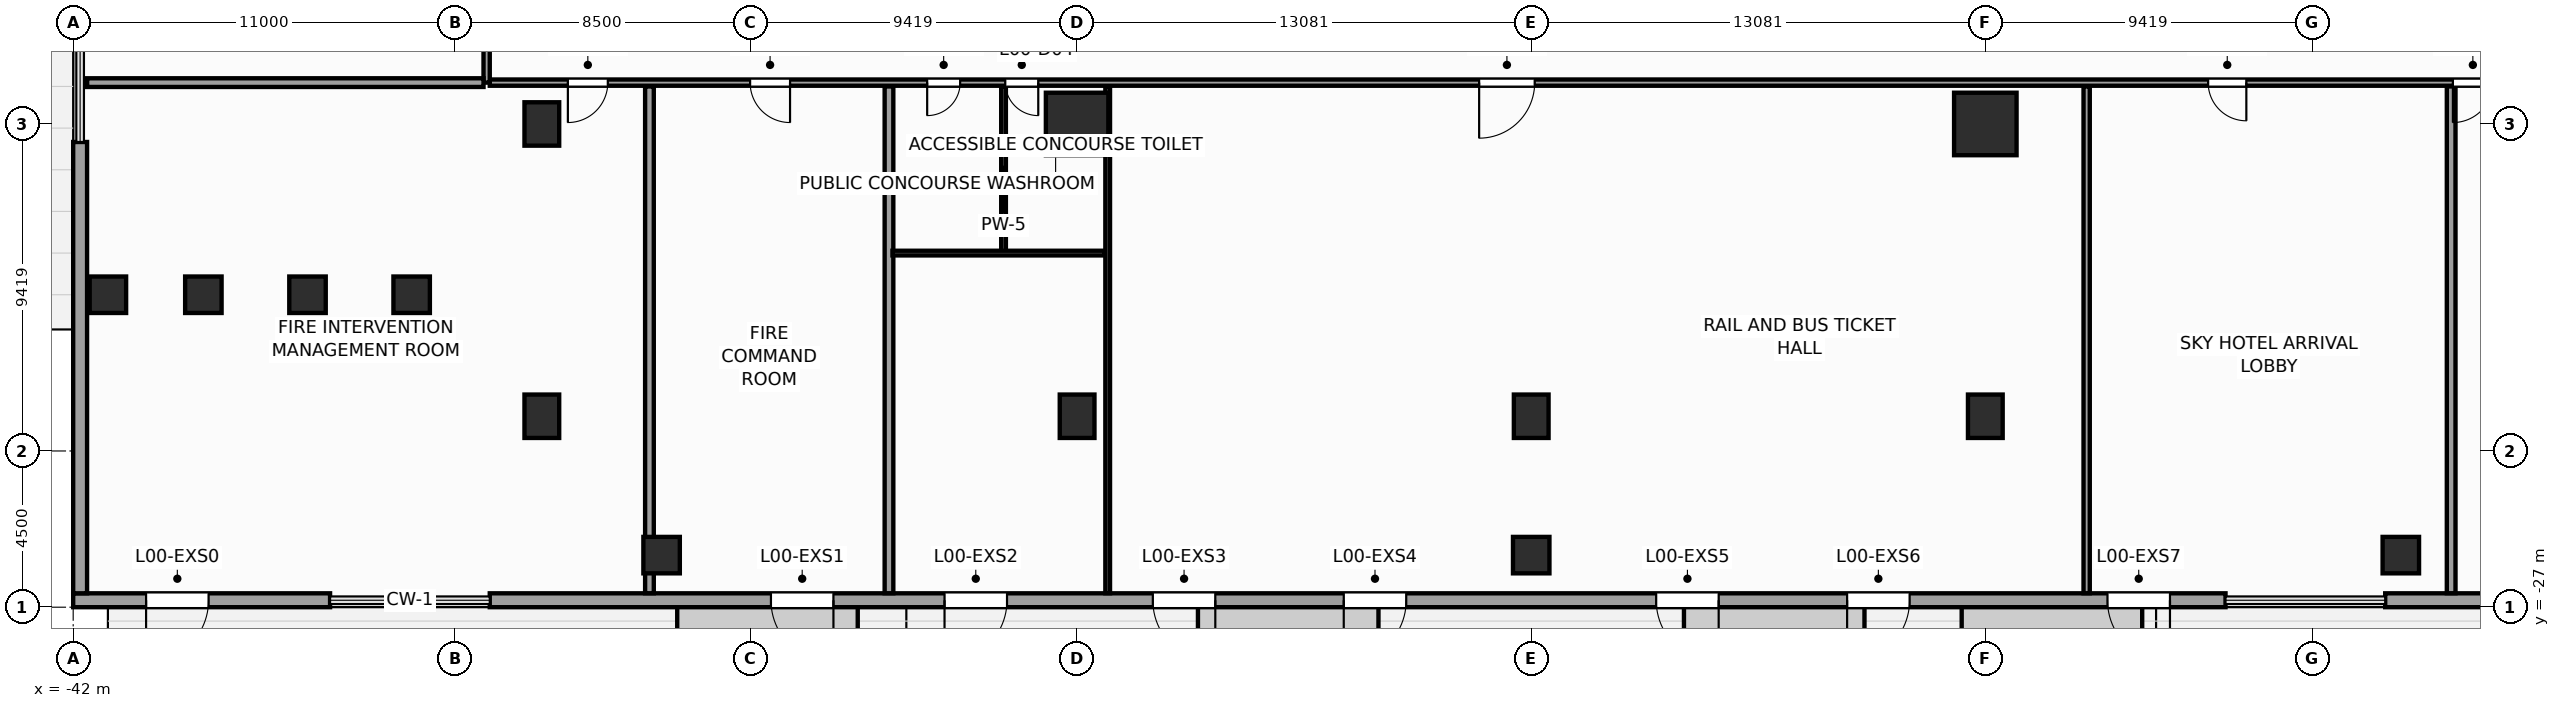
"""IFC4 building model, lengths in metres.
Left out: names, types, materials, properties, quantities, classifications, styles, units other than length and angle.
Written with IfcOpenShell. Run it as: python <this file> out.ifc"""

import sys

from ifc_helpers import new_model, si_unit, direction, frame, frame_2d, origin, origin_2d, place, context, subcontext, project, spatial, rectangle, extrude, source, transform, mapped, element, fill, save


model = new_model("IFC4")
c1 = context("Model", 3, precision=1e-05, world=origin(), true_north=direction((0.0, 1.0)))
c2 = subcontext(c1, "Body", "Model", "MODEL_VIEW")
j1 = project(units=[si_unit("LENGTHUNIT", "METRE"), si_unit("PLANEANGLEUNIT", "RADIAN")], contexts=[c1])
p1 = place(None, origin())
s1 = spatial("IfcSite", under=j1, at=p1, CompositionType="ELEMENT")
p2 = place(p1, origin())
s2 = spatial("IfcBuilding", under=s1, at=p2, CompositionType="ELEMENT")
p3 = place(p2, origin())
s3 = spatial("IfcBuildingStorey", under=s2, at=p3, CompositionType="ELEMENT", Elevation=0.0)
m1 = source(origin(), c2, "Body", "SweptSolid", [
    extrude(rectangle(XDim=1.8, YDim=1.8, at=origin_2d()), origin(), (0.0, 0.0, 1.0), 6.0),
])
for number, where, z_axis, x_axis in (
    (1, (-13.081, -13.081, 0.0), (0.0, 0.0, 1.0), (1.0, 0.0, 0.0)),
    (2, (13.081, -13.081, 0.0), (0.0, 0.0, 1.0), (1.0, 0.0, 0.0)),
):
    element("IfcColumn", number, at=place(p3, frame(where, z_axis=z_axis, x_axis=x_axis)), inside=s3, PredefinedType="COLUMN", context=c2, shape_type="MappedRepresentation", body=[
        mapped(m1, transform((0.0, 0.0, 0.0), scale=1.0)),
    ])
m2 = source(origin(), c2, "Body", "SweptSolid", [
    extrude(rectangle(XDim=1.0, YDim=1.25, at=origin_2d()), origin(), (0.0, 0.0, 1.0), 6.0),
])
for number, where, z_axis, x_axis in (
    (3, (-28.5, -21.5, 0.0), (0.0, 0.0, 1.0), (1.0, 0.0, 0.0)),
    (4, (-13.081, -21.5, 0.0), (0.0, 0.0, 1.0), (1.0, 0.0, 0.0)),
    (5, (0.0, -21.5, 0.0), (0.0, 0.0, 1.0), (1.0, 0.0, 0.0)),
    (6, (13.081, -21.5, 0.0), (0.0, 0.0, 1.0), (1.0, 0.0, 0.0)),
    (7, (-28.5, -13.081, 0.0), (0.0, 0.0, 1.0), (1.0, 0.0, 0.0)),
):
    element("IfcColumn", number, at=place(p3, frame(where, z_axis=z_axis, x_axis=x_axis)), inside=s3, PredefinedType="COLUMN", context=c2, shape_type="MappedRepresentation", body=[
        mapped(m2, transform((0.0, 0.0, 0.0), scale=1.0)),
    ])
m3 = source(origin(), c2, "Body", "SweptSolid", [
    extrude(rectangle(XDim=1.05, YDim=1.05, at=origin_2d()), origin(), (0.0, 0.0, 1.0), 6.0),
])
for number, where, z_axis, x_axis in (
    (8, (-25.05, -25.5, 0.0), (0.0, 0.0, 1.0), (1.0, 0.0, 0.0)),
    (9, (0.0, -25.5, 0.0), (0.0, 0.0, 1.0), (1.0, 0.0, 0.0)),
    (10, (25.05, -25.5, 0.0), (0.0, 0.0, 1.0), (1.0, 0.0, 0.0)),
    (11, (-32.25, -18.0, 0.0), (0.0, 0.0, 1.0), (1.0, 0.0, 0.0)),
    (12, (-35.25, -18.0, 0.0), (0.0, 0.0, 1.0), (1.0, 0.0, 0.0)),
    (13, (-38.25, -18.0, 0.0), (0.0, 0.0, 1.0), (1.0, 0.0, 0.0)),
    (14, (-41.0, -18.0, 0.0), (0.0, 0.0, 1.0), (1.0, 0.0, 0.0)),
):
    element("IfcColumn", number, at=place(p3, frame(where, z_axis=z_axis, x_axis=x_axis)), inside=s3, PredefinedType="COLUMN", context=c2, shape_type="MappedRepresentation", body=[
        mapped(m3, transform((0.0, 0.0, 0.0), scale=1.0)),
    ])
p4 = place(p3, frame((-42.0, -26.8, 0.0), z_axis=(0.0, 0.0, 1.0), x_axis=(1.0, 0.0, 0.0)))
e15 = element("IfcWall", 15, at=p4, inside=s3, PredefinedType="STANDARD", context=c2, shape_type="SweptSolid", body=[
    extrude(rectangle(XDim=7.4, YDim=0.4, at=frame_2d((3.7, 0.0))), origin(), (0.0, 0.0, 1.0), 5.66),
])
p5 = place(p4, frame((2.1, 0.0, 0.0)))
e16 = element("IfcOpeningElement", 16, at=p5, cuts=e15, PredefinedType="OPENING", context=c2, shape_type="SweptSolid", body=[
    extrude(rectangle(XDim=1.8, YDim=2.4, at=frame_2d((0.9, 1.2))), frame((0.0, 0.21, 0.0), z_axis=(0.0, -1.0, 0.0), x_axis=(1.0, 0.0, 0.0)), (0.0, 0.0, 1.0), 0.42),
])
p6 = place(p3, frame((-30.0, -26.8, 0.0), z_axis=(0.0, 0.0, 1.0), x_axis=(1.0, 0.0, 0.0)))
e17 = element("IfcWall", 17, at=p6, inside=s3, PredefinedType="STANDARD", context=c2, shape_type="SweptSolid", body=[
    extrude(rectangle(XDim=50.0, YDim=0.4, at=frame_2d((25.0, 0.0))), origin(), (0.0, 0.0, 1.0), 5.66),
])
p7 = place(p6, frame((8.1, 0.0, 0.0)))
e18 = element("IfcOpeningElement", 18, at=p7, cuts=e17, PredefinedType="OPENING", context=c2, shape_type="SweptSolid", body=[
    extrude(rectangle(XDim=1.8, YDim=2.4, at=frame_2d((0.9, 1.2))), frame((0.0, 0.21, 0.0), z_axis=(0.0, -1.0, 0.0), x_axis=(1.0, 0.0, 0.0)), (0.0, 0.0, 1.0), 0.42),
])
p8 = place(p6, frame((13.1, 0.0, 0.0)))
e19 = element("IfcOpeningElement", 19, at=p8, cuts=e17, PredefinedType="OPENING", context=c2, shape_type="SweptSolid", body=[
    extrude(rectangle(XDim=1.8, YDim=2.4, at=frame_2d((0.9, 1.2))), frame((0.0, 0.21, 0.0), z_axis=(0.0, -1.0, 0.0), x_axis=(1.0, 0.0, 0.0)), (0.0, 0.0, 1.0), 0.42),
])
p9 = place(p6, frame((19.1, 0.0, 0.0)))
e20 = element("IfcOpeningElement", 20, at=p9, cuts=e17, PredefinedType="OPENING", context=c2, shape_type="SweptSolid", body=[
    extrude(rectangle(XDim=1.8, YDim=2.4, at=frame_2d((0.9, 1.2))), frame((0.0, 0.21, 0.0), z_axis=(0.0, -1.0, 0.0), x_axis=(1.0, 0.0, 0.0)), (0.0, 0.0, 1.0), 0.42),
])
p10 = place(p6, frame((24.6, 0.0, 0.0)))
e21 = element("IfcOpeningElement", 21, at=p10, cuts=e17, PredefinedType="OPENING", context=c2, shape_type="SweptSolid", body=[
    extrude(rectangle(XDim=1.8, YDim=2.4, at=frame_2d((0.9, 1.2))), frame((0.0, 0.21, 0.0), z_axis=(0.0, -1.0, 0.0), x_axis=(1.0, 0.0, 0.0)), (0.0, 0.0, 1.0), 0.42),
])
p11 = place(p6, frame((33.6, 0.0, 0.0)))
e22 = element("IfcOpeningElement", 22, at=p11, cuts=e17, PredefinedType="OPENING", context=c2, shape_type="SweptSolid", body=[
    extrude(rectangle(XDim=1.8, YDim=2.4, at=frame_2d((0.9, 1.2))), frame((0.0, 0.21, 0.0), z_axis=(0.0, -1.0, 0.0), x_axis=(1.0, 0.0, 0.0)), (0.0, 0.0, 1.0), 0.42),
])
p12 = place(p6, frame((39.1, 0.0, 0.0)))
e23 = element("IfcOpeningElement", 23, at=p12, cuts=e17, PredefinedType="OPENING", context=c2, shape_type="SweptSolid", body=[
    extrude(rectangle(XDim=1.8, YDim=2.4, at=frame_2d((0.9, 1.2))), frame((0.0, 0.21, 0.0), z_axis=(0.0, -1.0, 0.0), x_axis=(1.0, 0.0, 0.0)), (0.0, 0.0, 1.0), 0.42),
])
p13 = place(p6, frame((46.6, 0.0, 0.0)))
e24 = element("IfcOpeningElement", 24, at=p13, cuts=e17, PredefinedType="OPENING", context=c2, shape_type="SweptSolid", body=[
    extrude(rectangle(XDim=1.8, YDim=2.4, at=frame_2d((0.9, 1.2))), frame((0.0, 0.21, 0.0), z_axis=(0.0, -1.0, 0.0), x_axis=(1.0, 0.0, 0.0)), (0.0, 0.0, 1.0), 0.42),
])
p14 = place(p3, frame((24.6, -26.8, 0.0), z_axis=(0.0, 0.0, 1.0), x_axis=(1.0, 0.0, 0.0)))
e25 = element("IfcWall", 25, at=p14, inside=s3, PredefinedType="STANDARD", context=c2, shape_type="SweptSolid", body=[
    extrude(rectangle(XDim=17.4, YDim=0.4, at=frame_2d((8.7, 0.0))), origin(), (0.0, 0.0, 1.0), 5.66),
])
p15 = place(p14, frame((3.5, 0.0, 0.0)))
e26 = element("IfcOpeningElement", 26, at=p15, cuts=e25, PredefinedType="OPENING", context=c2, shape_type="SweptSolid", body=[
    extrude(rectangle(XDim=3.2, YDim=3.6, at=frame_2d((1.6, 1.8))), frame((0.0, 0.21, 0.0), z_axis=(0.0, -1.0, 0.0), x_axis=(1.0, 0.0, 0.0)), (0.0, 0.0, 1.0), 0.42),
])
p16 = place(p14, frame((9.5, 0.0, 0.0)))
e27 = element("IfcOpeningElement", 27, at=p16, cuts=e25, PredefinedType="OPENING", context=c2, shape_type="SweptSolid", body=[
    extrude(rectangle(XDim=3.2, YDim=3.6, at=frame_2d((1.6, 1.8))), frame((0.0, 0.21, 0.0), z_axis=(0.0, -1.0, 0.0), x_axis=(1.0, 0.0, 0.0)), (0.0, 0.0, 1.0), 0.42),
])
p17 = place(p3, frame((-41.8, -26.6, 0.0), z_axis=(0.0, 0.0, 1.0), x_axis=(0.0, 1.0, 0.0)))
e28 = element("IfcWall", 28, at=p17, inside=s3, PredefinedType="STANDARD", context=c2, shape_type="SweptSolid", body=[
    extrude(rectangle(XDim=13.0, YDim=0.4, at=frame_2d((6.5, 0.0))), origin(), (0.0, 0.0, 1.0), 5.66),
])
p18 = place(p3, frame((-30.0, -11.89, 0.0), z_axis=(0.0, 0.0, 1.0), x_axis=(1.0, 0.0, 0.0)))
e29 = element("IfcWall", 29, at=p18, inside=s3, PredefinedType="PARTITIONING", context=c2, shape_type="SweptSolid", body=[
    extrude(rectangle(XDim=60.0, YDim=0.18, at=frame_2d((30.0, 0.0))), origin(), (0.0, 0.0, 1.0), 5.66),
])
p19 = place(p18, frame((2.25, 0.0, 0.0)))
e30 = element("IfcOpeningElement", 30, at=p19, cuts=e29, PredefinedType="OPENING", context=c2, shape_type="SweptSolid", body=[
    extrude(rectangle(XDim=1.15, YDim=2.25, at=frame_2d((0.575, 1.125))), frame((0.0, 0.1, 0.0), z_axis=(0.0, -1.0, 0.0), x_axis=(1.0, 0.0, 0.0)), (0.0, 0.0, 1.0), 0.2),
])
p20 = place(p18, frame((7.5, 0.0, 0.0)))
e31 = element("IfcOpeningElement", 31, at=p20, cuts=e29, PredefinedType="OPENING", context=c2, shape_type="SweptSolid", body=[
    extrude(rectangle(XDim=1.15, YDim=2.25, at=frame_2d((0.575, 1.125))), frame((0.0, 0.1, 0.0), z_axis=(0.0, -1.0, 0.0), x_axis=(1.0, 0.0, 0.0)), (0.0, 0.0, 1.0), 0.2),
])
p21 = place(p18, frame((12.6, 0.0, 0.0)))
e32 = element("IfcOpeningElement", 32, at=p21, cuts=e29, PredefinedType="OPENING", context=c2, shape_type="SweptSolid", body=[
    extrude(rectangle(XDim=0.95, YDim=2.1, at=frame_2d((0.475, 1.05))), frame((0.0, 0.1, 0.0), z_axis=(0.0, -1.0, 0.0), x_axis=(1.0, 0.0, 0.0)), (0.0, 0.0, 1.0), 0.2),
])
p22 = place(p18, frame((14.85, 0.0, 0.0)))
e33 = element("IfcOpeningElement", 33, at=p22, cuts=e29, PredefinedType="OPENING", context=c2, shape_type="SweptSolid", body=[
    extrude(rectangle(XDim=0.95, YDim=2.1, at=frame_2d((0.475, 1.05))), frame((0.0, 0.1, 0.0), z_axis=(0.0, -1.0, 0.0), x_axis=(1.0, 0.0, 0.0)), (0.0, 0.0, 1.0), 0.2),
])
p23 = place(p18, frame((28.5, 0.0, 0.0)))
e34 = element("IfcOpeningElement", 34, at=p23, cuts=e29, PredefinedType="OPENING", context=c2, shape_type="SweptSolid", body=[
    extrude(rectangle(XDim=1.6, YDim=2.5, at=frame_2d((0.8, 1.25))), frame((0.0, 0.1, 0.0), z_axis=(0.0, -1.0, 0.0), x_axis=(1.0, 0.0, 0.0)), (0.0, 0.0, 1.0), 0.2),
])
p24 = place(p18, frame((49.5, 0.0, 0.0)))
e35 = element("IfcOpeningElement", 35, at=p24, cuts=e29, PredefinedType="OPENING", context=c2, shape_type="SweptSolid", body=[
    extrude(rectangle(XDim=1.1, YDim=2.2, at=frame_2d((0.55, 1.1))), frame((0.0, 0.1, 0.0), z_axis=(0.0, -1.0, 0.0), x_axis=(1.0, 0.0, 0.0)), (0.0, 0.0, 1.0), 0.2),
])
p25 = place(p18, frame((56.55, 0.0, 0.0)))
e36 = element("IfcOpeningElement", 36, at=p25, cuts=e29, PredefinedType="OPENING", context=c2, shape_type="SweptSolid", body=[
    extrude(rectangle(XDim=1.15, YDim=2.25, at=frame_2d((0.575, 1.125))), frame((0.0, 0.1, 0.0), z_axis=(0.0, -1.0, 0.0), x_axis=(1.0, 0.0, 0.0)), (0.0, 0.0, 1.0), 0.2),
])
p26 = place(p3, frame((-30.09, -11.89, 0.0), z_axis=(0.0, 0.0, 1.0), x_axis=(0.0, 1.0, 0.0)))
e37 = element("IfcWall", 37, at=p26, inside=s3, PredefinedType="PARTITIONING", context=c2, shape_type="SweptSolid", body=[
    extrude(rectangle(XDim=3.38, YDim=0.18, at=frame_2d((1.69, 0.0))), origin(), (0.0, 0.0, 1.0), 5.66),
])
p27 = place(p3, frame((-41.598, -11.89, 0.0), z_axis=(0.0, 0.0, 1.0), x_axis=(1.0, 0.0, 0.0)))
e38 = element("IfcWall", 38, at=p27, inside=s3, PredefinedType="PARTITIONING", context=c2, shape_type="SweptSolid", body=[
    extrude(rectangle(XDim=11.418, YDim=0.25, at=frame_2d((5.709, 0.0))), origin(), (0.0, 0.0, 1.0), 5.66),
])
for number, where, z_axis, x_axis in (
    (39, (-25.4, -26.598, 0.0), (0.0, 0.0, 1.0), (0.0, 1.0, 0.0)),
    (40, (-18.5, -26.598, 0.0), (0.0, 0.0, 1.0), (0.0, 1.0, 0.0)),
):
    element("IfcWall", number, at=place(p3, frame(where, z_axis=z_axis, x_axis=x_axis)), inside=s3, PredefinedType="PARTITIONING", context=c2, shape_type="SweptSolid", body=[
        extrude(rectangle(XDim=14.598, YDim=0.25, at=frame_2d((7.299, 0.0))), origin(), (0.0, 0.0, 1.0), 5.66),
    ])
p28 = place(p3, frame((-15.2, -16.8, 0.0), z_axis=(0.0, 0.0, 1.0), x_axis=(0.0, 1.0, 0.0)))
e41 = element("IfcWall", 41, at=p28, inside=s3, PredefinedType="PARTITIONING", context=c2, shape_type="SweptSolid", body=[
    extrude(rectangle(XDim=4.8, YDim=0.135, at=frame_2d((2.4, 0.0))), origin(), (0.0, 0.0, 1.0), 5.66),
])
p29 = place(p3, frame((-12.2, -26.598, 0.0), z_axis=(0.0, 0.0, 1.0), x_axis=(0.0, 1.0, 0.0)))
e42 = element("IfcWall", 42, at=p29, inside=s3, PredefinedType="PARTITIONING", context=c2, shape_type="SweptSolid", body=[
    extrude(rectangle(XDim=14.598, YDim=0.135, at=frame_2d((7.299, 0.0))), origin(), (0.0, 0.0, 1.0), 5.66),
])
p30 = place(p3, frame((-18.4, -16.8, 0.0), z_axis=(0.0, 0.0, 1.0), x_axis=(1.0, 0.0, 0.0)))
e43 = element("IfcWall", 43, at=p30, inside=s3, PredefinedType="PARTITIONING", context=c2, shape_type="SweptSolid", body=[
    extrude(rectangle(XDim=6.1, YDim=0.135, at=frame_2d((3.05, 0.0))), origin(), (0.0, 0.0, 1.0), 5.66),
])
p31 = place(p3, frame((16.0, -26.598, 0.0), z_axis=(0.0, 0.0, 1.0), x_axis=(0.0, 1.0, 0.0)))
e44 = element("IfcWall", 44, at=p31, inside=s3, PredefinedType="PARTITIONING", context=c2, shape_type="SweptSolid", body=[
    extrude(rectangle(XDim=14.598, YDim=0.18, at=frame_2d((7.299, 0.0))), origin(), (0.0, 0.0, 1.0), 5.66),
])
p32 = place(p3, frame((26.5, -26.598, 0.0), z_axis=(0.0, 0.0, 1.0), x_axis=(0.0, 1.0, 0.0)))
e45 = element("IfcWall", 45, at=p32, inside=s3, PredefinedType="PARTITIONING", context=c2, shape_type="SweptSolid", body=[
    extrude(rectangle(XDim=14.598, YDim=0.25, at=frame_2d((7.299, 0.0))), origin(), (0.0, 0.0, 1.0), 5.66),
])
m4 = source(origin(), c2, "Body", "SweptSolid", [
    extrude(rectangle(XDim=1.8, YDim=2.4, at=frame_2d((0.9, 1.2))), frame((0.0, 0.025, 0.0), z_axis=(0.0, -1.0, 0.0), x_axis=(1.0, 0.0, 0.0)), (0.0, 0.0, 1.0), 0.05),
])
p33 = place(p5, frame((1.8, 0.0, 0.0), z_axis=(0.0, 0.0, 1.0), x_axis=(-1.0, 0.0, 0.0)))
e46 = element("IfcDoor", 46, at=p33, inside=s3, OperationType="SINGLE_SWING_LEFT", PredefinedType="DOOR", context=c2, shape_type="MappedRepresentation", body=[
    mapped(m4, transform((0.0, 0.0, 0.0), scale=1.0)),
])
fill(e16, e46)
p34 = place(p7, frame((1.8, 0.0, 0.0), z_axis=(0.0, 0.0, 1.0), x_axis=(-1.0, 0.0, 0.0)))
e47 = element("IfcDoor", 47, at=p34, inside=s3, OperationType="SINGLE_SWING_RIGHT", PredefinedType="DOOR", context=c2, shape_type="MappedRepresentation", body=[
    mapped(m4, transform((0.0, 0.0, 0.0), scale=1.0)),
])
fill(e18, e47)
p35 = place(p8, frame((1.8, 0.0, 0.0), z_axis=(0.0, 0.0, 1.0), x_axis=(-1.0, 0.0, 0.0)))
e48 = element("IfcDoor", 48, at=p35, inside=s3, OperationType="SINGLE_SWING_LEFT", PredefinedType="DOOR", context=c2, shape_type="MappedRepresentation", body=[
    mapped(m4, transform((0.0, 0.0, 0.0), scale=1.0)),
])
fill(e19, e48)
p36 = place(p9, frame((1.8, 0.0, 0.0), z_axis=(0.0, 0.0, 1.0), x_axis=(-1.0, 0.0, 0.0)))
e49 = element("IfcDoor", 49, at=p36, inside=s3, OperationType="SINGLE_SWING_RIGHT", PredefinedType="DOOR", context=c2, shape_type="MappedRepresentation", body=[
    mapped(m4, transform((0.0, 0.0, 0.0), scale=1.0)),
])
fill(e20, e49)
p37 = place(p10, frame((1.8, 0.0, 0.0), z_axis=(0.0, 0.0, 1.0), x_axis=(-1.0, 0.0, 0.0)))
e50 = element("IfcDoor", 50, at=p37, inside=s3, OperationType="SINGLE_SWING_LEFT", PredefinedType="DOOR", context=c2, shape_type="MappedRepresentation", body=[
    mapped(m4, transform((0.0, 0.0, 0.0), scale=1.0)),
])
fill(e21, e50)
p38 = place(p11, frame((1.8, 0.0, 0.0), z_axis=(0.0, 0.0, 1.0), x_axis=(-1.0, 0.0, 0.0)))
e51 = element("IfcDoor", 51, at=p38, inside=s3, OperationType="SINGLE_SWING_RIGHT", PredefinedType="DOOR", context=c2, shape_type="MappedRepresentation", body=[
    mapped(m4, transform((0.0, 0.0, 0.0), scale=1.0)),
])
fill(e22, e51)
p39 = place(p12, frame((1.8, 0.0, 0.0), z_axis=(0.0, 0.0, 1.0), x_axis=(-1.0, 0.0, 0.0)))
e52 = element("IfcDoor", 52, at=p39, inside=s3, OperationType="SINGLE_SWING_LEFT", PredefinedType="DOOR", context=c2, shape_type="MappedRepresentation", body=[
    mapped(m4, transform((0.0, 0.0, 0.0), scale=1.0)),
])
fill(e23, e52)
p40 = place(p13, frame((1.8, 0.0, 0.0), z_axis=(0.0, 0.0, 1.0), x_axis=(-1.0, 0.0, 0.0)))
e53 = element("IfcDoor", 53, at=p40, inside=s3, OperationType="SINGLE_SWING_RIGHT", PredefinedType="DOOR", context=c2, shape_type="MappedRepresentation", body=[
    mapped(m4, transform((0.0, 0.0, 0.0), scale=1.0)),
])
fill(e24, e53)
m5 = source(origin(), c2, "Body", "SweptSolid", [
    extrude(rectangle(XDim=1.15, YDim=2.25, at=frame_2d((0.575, 1.125))), frame((0.0, 0.025, 0.0), z_axis=(0.0, -1.0, 0.0), x_axis=(1.0, 0.0, 0.0)), (0.0, 0.0, 1.0), 0.05),
])
p41 = place(p19, frame((1.15, 0.0, 0.0), z_axis=(0.0, 0.0, 1.0), x_axis=(-1.0, 0.0, 0.0)))
e54 = element("IfcDoor", 54, at=p41, inside=s3, OperationType="SINGLE_SWING_LEFT", PredefinedType="DOOR", context=c2, shape_type="MappedRepresentation", body=[
    mapped(m5, transform((0.0, 0.0, 0.0), scale=1.0)),
])
fill(e30, e54)
p42 = place(p20, frame((1.15, 0.0, 0.0), z_axis=(0.0, 0.0, 1.0), x_axis=(-1.0, 0.0, 0.0)))
e55 = element("IfcDoor", 55, at=p42, inside=s3, OperationType="SINGLE_SWING_RIGHT", PredefinedType="DOOR", context=c2, shape_type="MappedRepresentation", body=[
    mapped(m5, transform((0.0, 0.0, 0.0), scale=1.0)),
])
fill(e31, e55)
m6 = source(origin(), c2, "Body", "SweptSolid", [
    extrude(rectangle(XDim=0.95, YDim=2.1, at=frame_2d((0.475, 1.05))), frame((0.0, 0.025, 0.0), z_axis=(0.0, -1.0, 0.0), x_axis=(1.0, 0.0, 0.0)), (0.0, 0.0, 1.0), 0.05),
])
p43 = place(p21, frame((0.95, 0.0, 0.0), z_axis=(0.0, 0.0, 1.0), x_axis=(-1.0, 0.0, 0.0)))
e56 = element("IfcDoor", 56, at=p43, inside=s3, OperationType="SINGLE_SWING_LEFT", PredefinedType="DOOR", context=c2, shape_type="MappedRepresentation", body=[
    mapped(m6, transform((0.0, 0.0, 0.0), scale=1.0)),
])
fill(e32, e56)
p44 = place(p22, frame((0.95, 0.0, 0.0), z_axis=(0.0, 0.0, 1.0), x_axis=(-1.0, 0.0, 0.0)))
e57 = element("IfcDoor", 57, at=p44, inside=s3, OperationType="SINGLE_SWING_RIGHT", PredefinedType="DOOR", context=c2, shape_type="MappedRepresentation", body=[
    mapped(m6, transform((0.0, 0.0, 0.0), scale=1.0)),
])
fill(e33, e57)
m7 = source(origin(), c2, "Body", "SweptSolid", [
    extrude(rectangle(XDim=1.6, YDim=2.5, at=frame_2d((0.8, 1.25))), frame((0.0, 0.025, 0.0), z_axis=(0.0, -1.0, 0.0), x_axis=(1.0, 0.0, 0.0)), (0.0, 0.0, 1.0), 0.05),
])
p45 = place(p23, frame((1.6, 0.0, 0.0), z_axis=(0.0, 0.0, 1.0), x_axis=(-1.0, 0.0, 0.0)))
e58 = element("IfcDoor", 58, at=p45, inside=s3, OperationType="SINGLE_SWING_LEFT", PredefinedType="DOOR", context=c2, shape_type="MappedRepresentation", body=[
    mapped(m7, transform((0.0, 0.0, 0.0), scale=1.0)),
])
fill(e34, e58)
m8 = source(origin(), c2, "Body", "SweptSolid", [
    extrude(rectangle(XDim=1.1, YDim=2.2, at=frame_2d((0.55, 1.1))), frame((0.0, 0.025, 0.0), z_axis=(0.0, -1.0, 0.0), x_axis=(1.0, 0.0, 0.0)), (0.0, 0.0, 1.0), 0.05),
])
p46 = place(p24, frame((1.1, 0.0, 0.0), z_axis=(0.0, 0.0, 1.0), x_axis=(-1.0, 0.0, 0.0)))
e59 = element("IfcDoor", 59, at=p46, inside=s3, OperationType="SINGLE_SWING_RIGHT", PredefinedType="DOOR", context=c2, shape_type="MappedRepresentation", body=[
    mapped(m8, transform((0.0, 0.0, 0.0), scale=1.0)),
])
fill(e35, e59)
p47 = place(p25, frame((1.15, 0.0, 0.0), z_axis=(0.0, 0.0, 1.0), x_axis=(-1.0, 0.0, 0.0)))
e60 = element("IfcDoor", 60, at=p47, inside=s3, OperationType="SINGLE_SWING_LEFT", PredefinedType="DOOR", context=c2, shape_type="MappedRepresentation", body=[
    mapped(m5, transform((0.0, 0.0, 0.0), scale=1.0)),
])
fill(e36, e60)
save(model, sys.argv[1])
